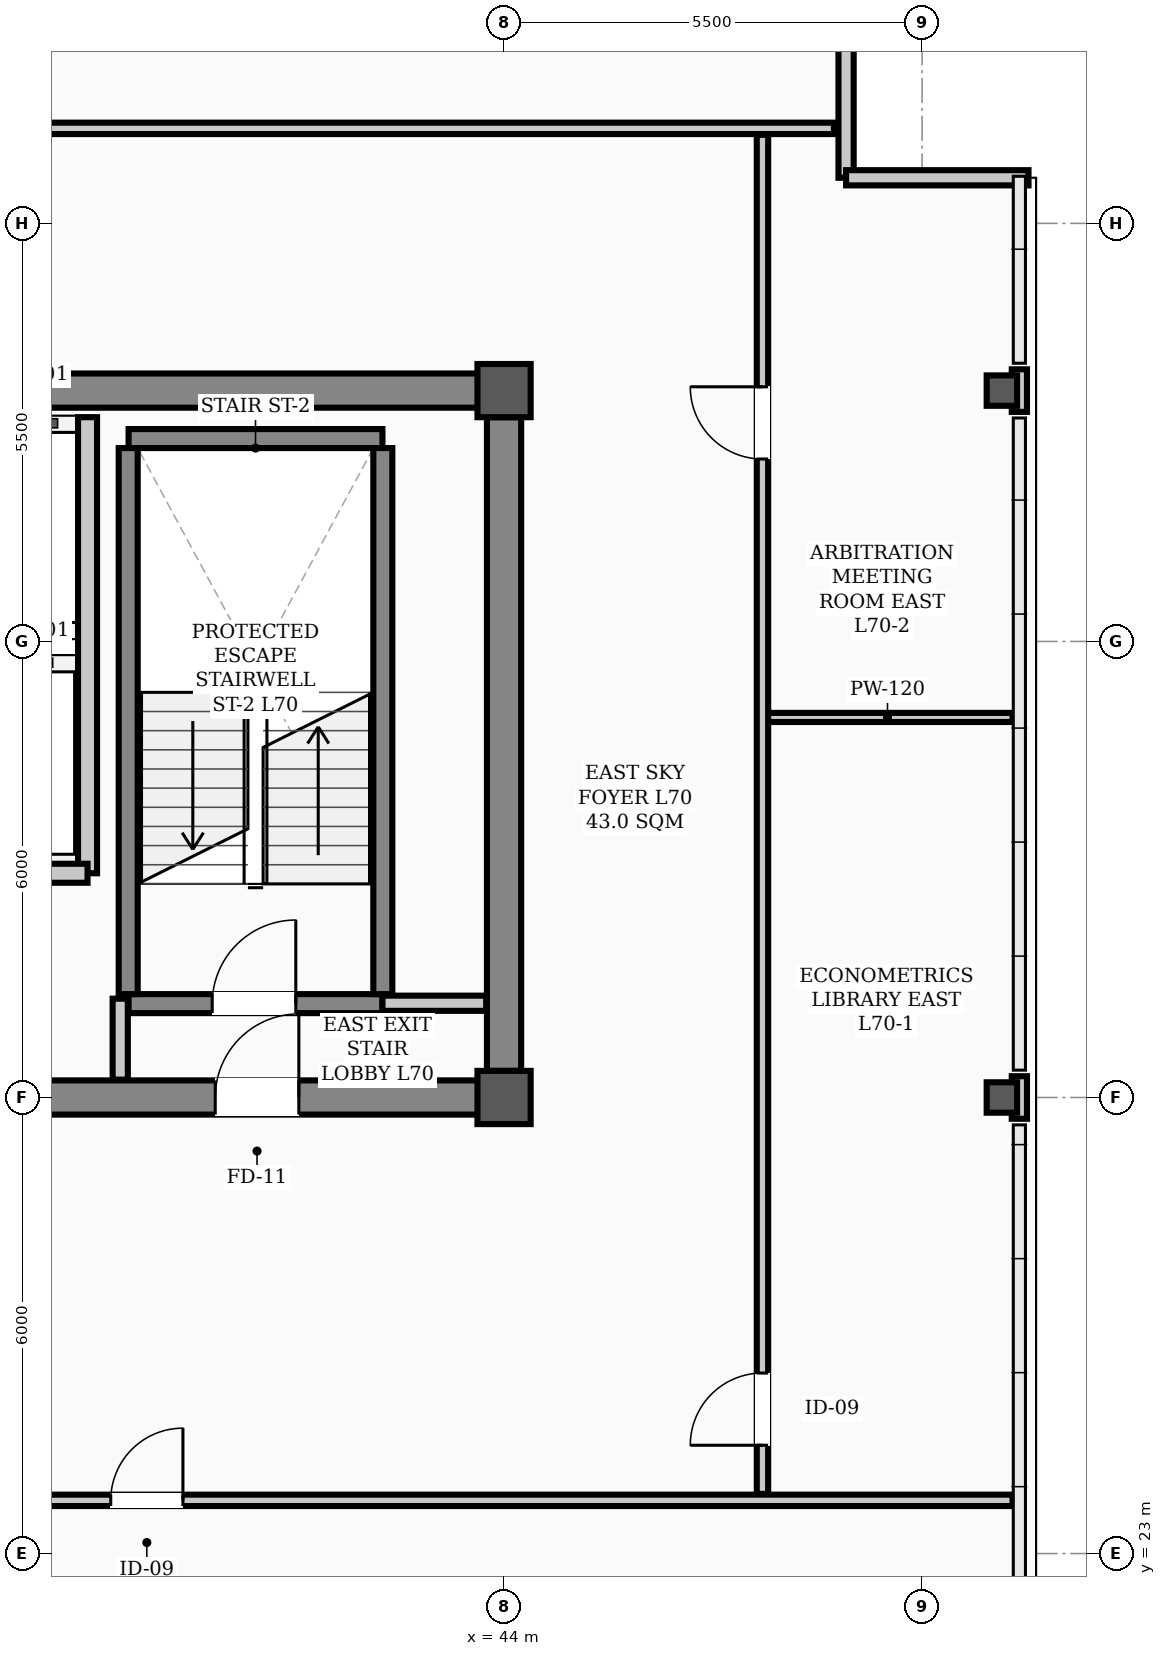
"""IFC4 building model, lengths in metres.
Left out: names, types, materials, properties, quantities, classifications, styles, units other than length and angle.
Written with IfcOpenShell. Run it as: python <this file> out.ifc"""

import sys

from ifc_helpers import new_model, si_unit, direction, frame, frame_2d, origin, origin_2d, place, context, subcontext, project, spatial, rectangle, hollow_rectangle, extrude, element, fill, save


model = new_model("IFC4")
c1 = context("Model", 3, precision=1e-05, world=origin(), true_north=direction((0.0, 1.0)))
c2 = subcontext(c1, "Body", "Model", "MODEL_VIEW")
j1 = project(units=[si_unit("LENGTHUNIT", "METRE"), si_unit("PLANEANGLEUNIT", "RADIAN")], contexts=[c1])
p1 = place(None, origin())
s1 = spatial("IfcSite", under=j1, at=p1, CompositionType="ELEMENT")
p2 = place(p1, origin())
s2 = spatial("IfcBuilding", under=s1, at=p2, CompositionType="ELEMENT")
p3 = place(p2, frame((0.0, 0.0, 281.3)))
s3 = spatial("IfcBuildingStorey", under=s2, at=p3, CompositionType="ELEMENT", Elevation=281.3)
for number, where, z_axis, x_axis in (
    (1, (44.0, 29.0, 0.0), (0.0, 0.0, 1.0), (1.0, 0.0, 0.0)),
    (2, (44.0, 38.3, 0.0), (0.0, 0.0, 1.0), (1.0, 0.0, 0.0)),
):
    element("IfcColumn", number, at=place(p3, frame(where, z_axis=z_axis, x_axis=x_axis)), inside=s3, PredefinedType="COLUMN", context=c2, shape_type="SweptSolid", body=[
        extrude(hollow_rectangle(XDim=0.7, YDim=0.7, WallThickness=0.028, InnerFilletRadius=0.014, OuterFilletRadius=0.042, at=origin_2d()), origin(), (0.0, 0.0, 1.0), 3.9),
    ])
for number, where, z_axis, x_axis in (
    (3, (50.55, 29.0, 0.0), (0.0, 0.0, 1.0), (1.0, 0.0, 0.0)),
    (4, (50.55, 38.3, 0.0), (0.0, 0.0, 1.0), (1.0, 0.0, 0.0)),
):
    element("IfcColumn", number, at=place(p3, frame(where, z_axis=z_axis, x_axis=x_axis)), inside=s3, PredefinedType="COLUMN", context=c2, shape_type="SweptSolid", body=[
        extrude(hollow_rectangle(XDim=0.4, YDim=0.4, WallThickness=0.02, InnerFilletRadius=0.02, OuterFilletRadius=0.04, at=origin_2d()), origin(), (0.0, 0.0, 1.0), 3.9),
    ])
for number, where, z_axis, x_axis in (
    (5, (50.78, 28.72, 0.0), (0.0, 0.0, 1.0), (0.0, 1.0, 0.0)),
    (6, (50.78, 38.02, 0.0), (0.0, 0.0, 1.0), (0.0, 1.0, 0.0)),
):
    element("IfcWall", number, at=place(p3, frame(where, z_axis=z_axis, x_axis=x_axis)), inside=s3, PredefinedType="PARAPET", context=c2, shape_type="SweptSolid", body=[
        extrude(rectangle(XDim=0.56, YDim=0.2, at=frame_2d((0.28, 0.0))), origin(), (0.0, 0.0, 1.0), 1.2),
    ])
for number, where, z_axis, x_axis in (
    (7, (48.5, 43.5, 0.0), (0.0, 0.0, 1.0), (0.0, -1.0, 0.0)),
    (8, (48.5, 41.1, 0.0), (0.0, 0.0, 1.0), (1.0, 0.0, 0.0)),
):
    element("IfcWall", number, at=place(p3, frame(where, z_axis=z_axis, x_axis=x_axis)), inside=s3, PredefinedType="PARAPET", context=c2, shape_type="SweptSolid", body=[
        extrude(rectangle(XDim=2.4, YDim=0.2, at=frame_2d((1.2, 0.0))), origin(), (0.0, 0.0, 1.0), 1.2),
    ])
p4 = place(p3, frame((13.5, 29.0, 0.0), z_axis=(0.0, 0.0, 1.0), x_axis=(1.0, 0.0, 0.0)))
e9 = element("IfcWall", 9, at=p4, inside=s3, PredefinedType="SHEAR", context=c2, shape_type="SweptSolid", body=[
    extrude(rectangle(XDim=30.5, YDim=0.45, at=frame_2d((15.25, 0.0))), origin(), (0.0, 0.0, 1.0), 3.72),
])
p5 = place(p4, frame((1.75, 0.0, 0.0)))
e10 = element("IfcOpeningElement", 10, at=p5, cuts=e9, PredefinedType="OPENING", context=c2, shape_type="SweptSolid", body=[
    extrude(rectangle(XDim=1.1, YDim=2.08, at=frame_2d((0.55, 1.04))), frame((0.0, 0.235, 0.0), z_axis=(0.0, -1.0, 0.0), x_axis=(1.0, 0.0, 0.0)), (0.0, 0.0, 1.0), 0.47),
])
p6 = place(p4, frame((26.7, 0.0, 0.0)))
e11 = element("IfcOpeningElement", 11, at=p6, cuts=e9, PredefinedType="OPENING", context=c2, shape_type="SweptSolid", body=[
    extrude(rectangle(XDim=1.1, YDim=2.08, at=frame_2d((0.55, 1.04))), frame((0.0, 0.235, 0.0), z_axis=(0.0, -1.0, 0.0), x_axis=(1.0, 0.0, 0.0)), (0.0, 0.0, 1.0), 0.47),
])
p7 = place(p4, frame((6.8, 0.0, 0.0)))
e12 = element("IfcOpeningElement", 12, at=p7, cuts=e9, PredefinedType="OPENING", context=c2, shape_type="SweptSolid", body=[
    extrude(rectangle(XDim=1.1, YDim=2.08, at=frame_2d((0.55, 1.04))), frame((0.0, 0.235, 0.0), z_axis=(0.0, -1.0, 0.0), x_axis=(1.0, 0.0, 0.0)), (0.0, 0.0, 1.0), 0.47),
])
p8 = place(p4, frame((13.2, 0.0, 0.0)))
e13 = element("IfcOpeningElement", 13, at=p8, cuts=e9, PredefinedType="OPENING", context=c2, shape_type="SweptSolid", body=[
    extrude(rectangle(XDim=1.6, YDim=2.08, at=frame_2d((0.8, 1.04))), frame((0.0, 0.235, 0.0), z_axis=(0.0, -1.0, 0.0), x_axis=(1.0, 0.0, 0.0)), (0.0, 0.0, 1.0), 0.47),
])
p9 = place(p4, frame((20.525, 0.0, 0.0)))
e14 = element("IfcOpeningElement", 14, at=p9, cuts=e9, PredefinedType="OPENING", context=c2, shape_type="SweptSolid", body=[
    extrude(rectangle(XDim=0.95, YDim=2.08, at=frame_2d((0.475, 1.04))), frame((0.0, 0.235, 0.0), z_axis=(0.0, -1.0, 0.0), x_axis=(1.0, 0.0, 0.0)), (0.0, 0.0, 1.0), 0.47),
])
p10 = place(p3, frame((13.5, 38.3, 0.0), z_axis=(0.0, 0.0, 1.0), x_axis=(1.0, 0.0, 0.0)))
e15 = element("IfcWall", 15, at=p10, inside=s3, PredefinedType="SHEAR", context=c2, shape_type="SweptSolid", body=[
    extrude(rectangle(XDim=30.5, YDim=0.45, at=frame_2d((15.25, 0.0))), origin(), (0.0, 0.0, 1.0), 3.72),
])
p11 = place(p3, frame((44.0, 29.35, 0.0), z_axis=(0.0, 0.0, 1.0), x_axis=(0.0, 1.0, 0.0)))
e16 = element("IfcWall", 16, at=p11, inside=s3, PredefinedType="SHEAR", context=c2, shape_type="SweptSolid", body=[
    extrude(rectangle(XDim=8.6, YDim=0.45, at=frame_2d((4.3, 0.0))), origin(), (0.0, 0.0, 1.0), 3.72),
])
p12 = place(p3, frame((39.06, 30.235, 0.0), z_axis=(0.0, 0.0, 1.0), x_axis=(1.0, 0.0, 0.0)))
e17 = element("IfcWall", 17, at=p12, inside=s3, PredefinedType="STANDARD", context=c2, shape_type="SweptSolid", body=[
    extrude(rectangle(XDim=3.34, YDim=0.25, at=frame_2d((1.67, 0.0))), origin(), (0.0, 0.0, 1.0), 3.72),
])
p13 = place(p12, frame((1.1, 0.0, 0.0)))
e18 = element("IfcOpeningElement", 18, at=p13, cuts=e17, PredefinedType="OPENING", context=c2, shape_type="SweptSolid", body=[
    extrude(rectangle(XDim=1.1, YDim=2.08, at=frame_2d((0.55, 1.04))), frame((0.0, 0.135, 0.0), z_axis=(0.0, -1.0, 0.0), x_axis=(1.0, 0.0, 0.0)), (0.0, 0.0, 1.0), 0.27),
])
p14 = place(p3, frame((39.06, 37.669, 0.0), z_axis=(0.0, 0.0, 1.0), x_axis=(1.0, 0.0, 0.0)))
e19 = element("IfcWall", 19, at=p14, inside=s3, PredefinedType="STANDARD", context=c2, shape_type="SweptSolid", body=[
    extrude(rectangle(XDim=3.34, YDim=0.25, at=frame_2d((1.67, 0.0))), origin(), (0.0, 0.0, 1.0), 3.72),
])
for number, where, z_axis, x_axis in (
    (20, (39.055, 30.36, 0.0), (0.0, 0.0, 1.0), (0.0, 1.0, 0.0)),
    (21, (42.405, 30.36, 0.0), (0.0, 0.0, 1.0), (0.0, 1.0, 0.0)),
):
    element("IfcWall", number, at=place(p3, frame(where, z_axis=z_axis, x_axis=x_axis)), inside=s3, PredefinedType="STANDARD", context=c2, shape_type="SweptSolid", body=[
        extrude(rectangle(XDim=7.184, YDim=0.25, at=frame_2d((3.592, 0.0))), origin(), (0.0, 0.0, 1.0), 3.72),
    ])
p15 = place(p3, frame((38.52, 31.95, 0.0), z_axis=(0.0, 0.0, 1.0), x_axis=(0.0, 1.0, 0.0)))
e22 = element("IfcWall", 22, at=p15, inside=s3, PredefinedType="STANDARD", context=c2, shape_type="SweptSolid", body=[
    extrude(rectangle(XDim=6.0, YDim=0.25, at=frame_2d((3.0, 0.0))), origin(), (0.0, 0.0, 1.0), 3.4),
])
p16 = place(p3, frame((36.62, 31.95, 0.0), z_axis=(0.0, 0.0, 1.0), x_axis=(1.0, 0.0, 0.0)))
e23 = element("IfcWall", 23, at=p16, inside=s3, PredefinedType="STANDARD", context=c2, shape_type="SweptSolid", body=[
    extrude(rectangle(XDim=1.9, YDim=0.25, at=frame_2d((0.95, 0.0))), origin(), (0.0, 0.0, 1.0), 3.48),
])
p17 = place(p3, frame((42.4, 30.24, 0.0), z_axis=(0.0, 0.0, 1.0), x_axis=(1.0, 0.0, 0.0)))
e24 = element("IfcWall", 24, at=p17, inside=s3, PredefinedType="STANDARD", context=c2, shape_type="SweptSolid", body=[
    extrude(rectangle(XDim=1.365, YDim=0.2, at=frame_2d((0.683, 0.0))), origin(), (0.0, 0.0, 1.0), 3.2),
])
p18 = place(p3, frame((12.31, 23.7, 0.0), z_axis=(0.0, 0.0, 1.0), x_axis=(1.0, 0.0, 0.0)))
e25 = element("IfcWall", 25, at=p18, inside=s3, PredefinedType="PARTITIONING", context=c2, shape_type="SweptSolid", body=[
    extrude(rectangle(XDim=38.38, YDim=0.15, at=frame_2d((19.19, 0.0))), origin(), (0.0, 0.0, 1.0), 3.2),
])
p19 = place(p18, frame((8.97, 0.0, 0.0)))
e26 = element("IfcOpeningElement", 26, at=p19, cuts=e25, PredefinedType="OPENING", context=c2, shape_type="SweptSolid", body=[
    extrude(rectangle(XDim=0.95, YDim=2.08, at=frame_2d((0.475, 1.04))), frame((0.0, 0.085, 0.0), z_axis=(0.0, -1.0, 0.0), x_axis=(1.0, 0.0, 0.0)), (0.0, 0.0, 1.0), 0.17),
])
p20 = place(p18, frame((26.515, 0.0, 0.0)))
e27 = element("IfcOpeningElement", 27, at=p20, cuts=e25, PredefinedType="OPENING", context=c2, shape_type="SweptSolid", body=[
    extrude(rectangle(XDim=0.95, YDim=2.08, at=frame_2d((0.475, 1.04))), frame((0.0, 0.085, 0.0), z_axis=(0.0, -1.0, 0.0), x_axis=(1.0, 0.0, 0.0)), (0.0, 0.0, 1.0), 0.17),
])
p21 = place(p3, frame((47.4, 34.0, 0.0), z_axis=(0.0, 0.0, 1.0), x_axis=(1.0, 0.0, 0.0)))
e28 = element("IfcWall", 28, at=p21, inside=s3, PredefinedType="PARTITIONING", context=c2, shape_type="SweptSolid", body=[
    extrude(rectangle(XDim=3.29, YDim=0.12, at=frame_2d((1.645, 0.0))), origin(), (0.0, 0.0, 1.0), 3.212),
])
p22 = place(p3, frame((14.66, 41.75, 0.0), z_axis=(0.0, 0.0, 1.0), x_axis=(1.0, 0.0, 0.0)))
e29 = element("IfcWall", 29, at=p22, inside=s3, PredefinedType="PARTITIONING", context=c2, shape_type="SweptSolid", body=[
    extrude(rectangle(XDim=33.68, YDim=0.15, at=frame_2d((16.84, 0.0))), origin(), (0.0, 0.0, 1.0), 3.2),
])
p23 = place(p3, frame((38.95, 29.235, 0.0), z_axis=(0.0, 0.0, 1.0), x_axis=(0.0, 1.0, 0.0)))
e30 = element("IfcWall", 30, at=p23, inside=s3, PredefinedType="STANDARD", context=c2, shape_type="SweptSolid", body=[
    extrude(rectangle(XDim=1.065, YDim=0.2, at=frame_2d((0.532, 0.0))), origin(), (0.0, 0.0, 1.0), 3.4),
])
p24 = place(p3, frame((47.4, 23.785, 0.0), z_axis=(0.0, 0.0, 1.0), x_axis=(0.0, 1.0, 0.0)))
e31 = element("IfcWall", 31, at=p24, inside=s3, PredefinedType="PARTITIONING", context=c2, shape_type="SweptSolid", body=[
    extrude(rectangle(XDim=17.88, YDim=0.15, at=frame_2d((8.94, 0.0))), origin(), (0.0, 0.0, 1.0), 3.1),
])
p25 = place(p24, frame((0.64, 0.0, 0.0)))
e32 = element("IfcOpeningElement", 32, at=p25, cuts=e31, PredefinedType="OPENING", context=c2, shape_type="SweptSolid", body=[
    extrude(rectangle(XDim=0.95, YDim=2.08, at=frame_2d((0.475, 1.04))), frame((0.0, 0.085, 0.0), z_axis=(0.0, -1.0, 0.0), x_axis=(1.0, 0.0, 0.0)), (0.0, 0.0, 1.0), 0.17),
])
p26 = place(p24, frame((13.615, 0.0, 0.0)))
e33 = element("IfcOpeningElement", 33, at=p26, cuts=e31, PredefinedType="OPENING", context=c2, shape_type="SweptSolid", body=[
    extrude(rectangle(XDim=0.95, YDim=2.08, at=frame_2d((0.475, 1.04))), frame((0.0, 0.085, 0.0), z_axis=(0.0, -1.0, 0.0), x_axis=(1.0, 0.0, 0.0)), (0.0, 0.0, 1.0), 0.17),
])
p27 = place(p13, origin())
e34 = element("IfcDoor", 34, at=p27, inside=s3, OperationType="SINGLE_SWING_RIGHT", PredefinedType="DOOR", context=c2, shape_type="SweptSolid", body=[
    extrude(rectangle(XDim=1.1, YDim=2.08, at=frame_2d((0.55, 1.04))), frame((0.0, 0.025, 0.0), z_axis=(0.0, -1.0, 0.0), x_axis=(1.0, 0.0, 0.0)), (0.0, 0.0, 1.0), 0.05),
])
fill(e18, e34)
p28 = place(p6, origin())
e35 = element("IfcDoor", 35, at=p28, inside=s3, OperationType="SINGLE_SWING_RIGHT", PredefinedType="DOOR", context=c2, shape_type="SweptSolid", body=[
    extrude(rectangle(XDim=1.1, YDim=2.08, at=frame_2d((0.55, 1.04))), frame((0.0, 0.025, 0.0), z_axis=(0.0, -1.0, 0.0), x_axis=(1.0, 0.0, 0.0)), (0.0, 0.0, 1.0), 0.05),
])
fill(e11, e35)
p29 = place(p20, origin())
e36 = element("IfcDoor", 36, at=p29, inside=s3, OperationType="SINGLE_SWING_RIGHT", PredefinedType="DOOR", context=c2, shape_type="SweptSolid", body=[
    extrude(rectangle(XDim=0.95, YDim=2.08, at=frame_2d((0.475, 1.04))), frame((0.0, 0.025, 0.0), z_axis=(0.0, -1.0, 0.0), x_axis=(1.0, 0.0, 0.0)), (0.0, 0.0, 1.0), 0.05),
])
fill(e27, e36)
p30 = place(p25, origin())
e37 = element("IfcDoor", 37, at=p30, inside=s3, OperationType="SINGLE_SWING_LEFT", PredefinedType="DOOR", context=c2, shape_type="SweptSolid", body=[
    extrude(rectangle(XDim=0.95, YDim=2.08, at=frame_2d((0.475, 1.04))), frame((0.0, 0.025, 0.0), z_axis=(0.0, -1.0, 0.0), x_axis=(1.0, 0.0, 0.0)), (0.0, 0.0, 1.0), 0.05),
])
fill(e32, e37)
p31 = place(p26, origin())
e38 = element("IfcDoor", 38, at=p31, inside=s3, OperationType="SINGLE_SWING_RIGHT", PredefinedType="DOOR", context=c2, shape_type="SweptSolid", body=[
    extrude(rectangle(XDim=0.95, YDim=2.08, at=frame_2d((0.475, 1.04))), frame((0.0, 0.025, 0.0), z_axis=(0.0, -1.0, 0.0), x_axis=(1.0, 0.0, 0.0)), (0.0, 0.0, 1.0), 0.05),
])
fill(e33, e38)
save(model, sys.argv[1])
